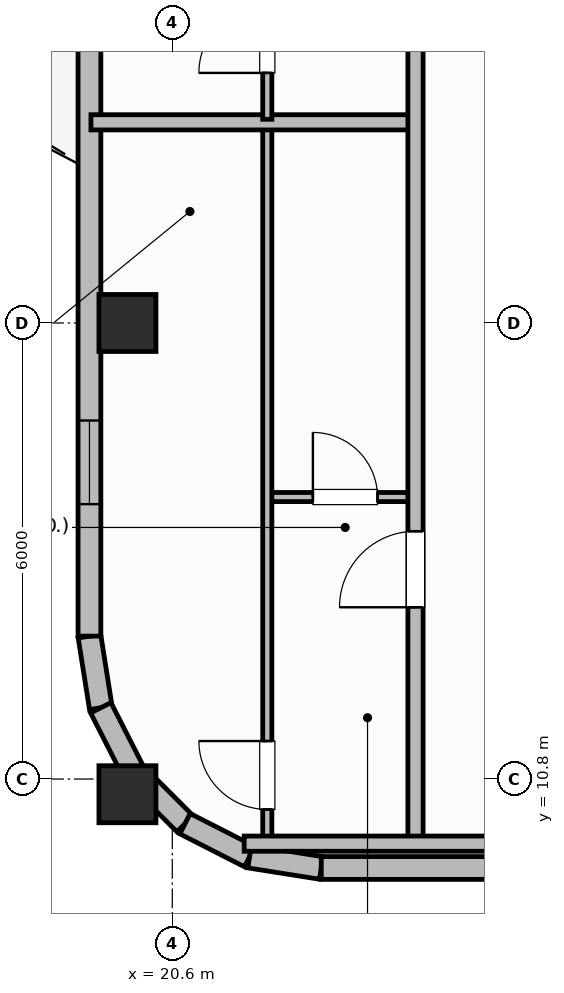
"""IFC4 building model, lengths in metres.
Left out: names, types, materials, properties, quantities, classifications, styles, units other than length and angle.
Written with IfcOpenShell. Run it as: python <this file> out.ifc"""

import sys

from ifc_helpers import new_model, si_unit, direction, frame, frame_2d, origin, origin_2d, place, context, subcontext, project, spatial, rectangle, extrude, element, fill, save


model = new_model("IFC4")
c1 = context("Model", 3, precision=1e-05, world=origin(), true_north=direction((0.0, 1.0)))
c2 = subcontext(c1, "Body", "Model", "MODEL_VIEW")
j1 = project(units=[si_unit("LENGTHUNIT", "METRE"), si_unit("PLANEANGLEUNIT", "RADIAN")], contexts=[c1])
p1 = place(None, origin())
s1 = spatial("IfcSite", under=j1, at=p1, CompositionType="ELEMENT")
p2 = place(p1, origin())
s2 = spatial("IfcBuilding", under=s1, at=p2, CompositionType="ELEMENT")
p3 = place(p2, frame((0.0, 0.0, 271.3)))
s3 = spatial("IfcBuildingStorey", under=s2, at=p3, CompositionType="ELEMENT", Elevation=271.3)
for number, where, z_axis, x_axis in (
    (1, (20.01, 10.6, 0.0), (0.0, 0.0, 1.0), (1.0, 0.0, 0.0)),
    (2, (20.01, 16.8, 0.0), (0.0, 0.0, 1.0), (1.0, 0.0, 0.0)),
):
    element("IfcColumn", number, at=place(p3, frame(where, z_axis=z_axis, x_axis=x_axis)), inside=s3, PredefinedType="COLUMN", context=c2, shape_type="SweptSolid", body=[
        extrude(rectangle(XDim=0.75, YDim=0.75, at=origin_2d()), origin(), (0.0, 0.0, 1.0), 3.7),
    ])
p4 = place(p3, frame((19.51, 12.68, 0.0), z_axis=(0.0, 0.0, 1.0), x_axis=(0.156343617883, -0.987702725088, 0.0)))
e3 = element("IfcWall", 3, at=p4, inside=s3, PredefinedType="SOLIDWALL", context=c2, shape_type="SweptSolid", body=[
    extrude(rectangle(XDim=0.954, YDim=0.3, at=frame_2d((0.477, 0.0))), origin(), (0.0, 0.0, 1.0), 2.73),
])
for number, where, z_axis, x_axis in (
    (4, (19.659, 11.738, 0.0), (0.0, 0.0, 1.0), (0.454, -0.891, 0.0)),
    (5, (20.093, 10.887, 0.0), (0.0, 0.0, 1.0), (0.707, -0.707, 0.0)),
):
    element("IfcWall", number, at=place(p3, frame(where, z_axis=z_axis, x_axis=x_axis)), inside=s3, PredefinedType="SOLIDWALL", context=c2, shape_type="SweptSolid", body=[
        extrude(rectangle(XDim=0.954, YDim=0.3, at=frame_2d((0.477, 0.0))), origin(), (0.0, 0.0, 1.0), 2.73),
    ])
p5 = place(p3, frame((20.767, 10.212, 0.0), z_axis=(0.0, 0.0, 1.0), x_axis=(0.891023873617, -0.45395644796, 0.0)))
e6 = element("IfcWall", 6, at=p5, inside=s3, PredefinedType="SOLIDWALL", context=c2, shape_type="SweptSolid", body=[
    extrude(rectangle(XDim=0.954, YDim=0.3, at=frame_2d((0.477, 0.0))), origin(), (0.0, 0.0, 1.0), 2.73),
])
p6 = place(p3, frame((21.617, 9.779, 0.0), z_axis=(0.0, 0.0, 1.0), x_axis=(0.987669453596, -0.156553666304, 0.0)))
e7 = element("IfcWall", 7, at=p6, inside=s3, PredefinedType="SOLIDWALL", context=c2, shape_type="SweptSolid", body=[
    extrude(rectangle(XDim=0.954, YDim=0.3, at=frame_2d((0.477, 0.0))), origin(), (0.0, 0.0, 1.0), 2.73),
])
p7 = place(p3, frame((22.56, 9.63, 0.0), z_axis=(0.0, 0.0, 1.0), x_axis=(1.0, 0.0, 0.0)))
e8 = element("IfcWall", 8, at=p7, inside=s3, PredefinedType="SOLIDWALL", context=c2, shape_type="SweptSolid", body=[
    extrude(rectangle(XDim=33.28, YDim=0.3, at=frame_2d((16.64, 0.0))), origin(), (0.0, 0.0, 1.0), 2.73),
])
p8 = place(p7, frame((4.448, 0.0, 0.95)))
e9 = element("IfcOpeningElement", 9, at=p8, cuts=e8, PredefinedType="OPENING", context=c2, shape_type="SweptSolid", body=[
    extrude(rectangle(XDim=1.1, YDim=1.65, at=frame_2d((0.55, 0.825))), frame((0.0, 0.16, 0.0), z_axis=(0.0, -1.0, 0.0), x_axis=(1.0, 0.0, 0.0)), (0.0, 0.0, 1.0), 0.32),
])
p9 = place(p7, frame((6.762, 0.0, 0.95)))
e10 = element("IfcOpeningElement", 10, at=p9, cuts=e8, PredefinedType="OPENING", context=c2, shape_type="SweptSolid", body=[
    extrude(rectangle(XDim=1.1, YDim=1.65, at=frame_2d((0.55, 0.825))), frame((0.0, 0.16, 0.0), z_axis=(0.0, -1.0, 0.0), x_axis=(1.0, 0.0, 0.0)), (0.0, 0.0, 1.0), 0.32),
])
p10 = place(p7, frame((9.427, 0.0, 0.95)))
e11 = element("IfcOpeningElement", 11, at=p10, cuts=e8, PredefinedType="OPENING", context=c2, shape_type="SweptSolid", body=[
    extrude(rectangle(XDim=1.1, YDim=1.65, at=frame_2d((0.55, 0.825))), frame((0.0, 0.16, 0.0), z_axis=(0.0, -1.0, 0.0), x_axis=(1.0, 0.0, 0.0)), (0.0, 0.0, 1.0), 0.32),
])
p11 = place(p7, frame((14.758, 0.0, 0.95)))
e12 = element("IfcOpeningElement", 12, at=p11, cuts=e8, PredefinedType="OPENING", context=c2, shape_type="SweptSolid", body=[
    extrude(rectangle(XDim=1.1, YDim=1.65, at=frame_2d((0.55, 0.825))), frame((0.0, 0.16, 0.0), z_axis=(0.0, -1.0, 0.0), x_axis=(1.0, 0.0, 0.0)), (0.0, 0.0, 1.0), 0.32),
])
p12 = place(p7, frame((17.423, 0.0, 0.95)))
e13 = element("IfcOpeningElement", 13, at=p12, cuts=e8, PredefinedType="OPENING", context=c2, shape_type="SweptSolid", body=[
    extrude(rectangle(XDim=1.1, YDim=1.65, at=frame_2d((0.55, 0.825))), frame((0.0, 0.16, 0.0), z_axis=(0.0, -1.0, 0.0), x_axis=(1.0, 0.0, 0.0)), (0.0, 0.0, 1.0), 0.32),
])
p13 = place(p7, frame((22.752, 0.0, 0.95)))
e14 = element("IfcOpeningElement", 14, at=p13, cuts=e8, PredefinedType="OPENING", context=c2, shape_type="SweptSolid", body=[
    extrude(rectangle(XDim=1.1, YDim=1.65, at=frame_2d((0.55, 0.825))), frame((0.0, 0.16, 0.0), z_axis=(0.0, -1.0, 0.0), x_axis=(1.0, 0.0, 0.0)), (0.0, 0.0, 1.0), 0.32),
])
p14 = place(p7, frame((25.417, 0.0, 0.95)))
e15 = element("IfcOpeningElement", 15, at=p14, cuts=e8, PredefinedType="OPENING", context=c2, shape_type="SweptSolid", body=[
    extrude(rectangle(XDim=1.1, YDim=1.65, at=frame_2d((0.55, 0.825))), frame((0.0, 0.16, 0.0), z_axis=(0.0, -1.0, 0.0), x_axis=(1.0, 0.0, 0.0)), (0.0, 0.0, 1.0), 0.32),
])
p15 = place(p7, frame((27.732, 0.0, 0.95)))
e16 = element("IfcOpeningElement", 16, at=p15, cuts=e8, PredefinedType="OPENING", context=c2, shape_type="SweptSolid", body=[
    extrude(rectangle(XDim=1.1, YDim=1.65, at=frame_2d((0.55, 0.825))), frame((0.0, 0.16, 0.0), z_axis=(0.0, -1.0, 0.0), x_axis=(1.0, 0.0, 0.0)), (0.0, 0.0, 1.0), 0.32),
])
p16 = place(p3, frame((19.51, 23.8, 0.0), z_axis=(0.0, 0.0, 1.0), x_axis=(0.0, -1.0, 0.0)))
e17 = element("IfcWall", 17, at=p16, inside=s3, PredefinedType="SOLIDWALL", context=c2, shape_type="SweptSolid", body=[
    extrude(rectangle(XDim=11.12, YDim=0.3, at=frame_2d((5.56, 0.0))), origin(), (0.0, 0.0, 1.0), 2.73),
])
p17 = place(p16, frame((1.7, 0.0, 0.0)))
e18 = element("IfcOpeningElement", 18, at=p17, cuts=e17, PredefinedType="OPENING", context=c2, shape_type="SweptSolid", body=[
    extrude(rectangle(XDim=1.6, YDim=2.1, at=frame_2d((0.8, 1.05))), frame((0.0, 0.16, 0.0), z_axis=(0.0, -1.0, 0.0), x_axis=(1.0, 0.0, 0.0)), (0.0, 0.0, 1.0), 0.32),
])
p18 = place(p16, frame((8.283, 0.0, 0.95)))
e19 = element("IfcOpeningElement", 19, at=p18, cuts=e17, PredefinedType="OPENING", context=c2, shape_type="SweptSolid", body=[
    extrude(rectangle(XDim=1.1, YDim=1.65, at=frame_2d((0.55, 0.825))), frame((0.0, 0.16, 0.0), z_axis=(0.0, -1.0, 0.0), x_axis=(1.0, 0.0, 0.0)), (0.0, 0.0, 1.0), 0.32),
])
p19 = place(p3, frame((21.85, 14.51, 0.0), z_axis=(0.0, 0.0, 1.0), x_axis=(1.0, 0.0, 0.0)))
e20 = element("IfcWall", 20, at=p19, inside=s3, PredefinedType="PARTITIONING", context=c2, shape_type="SweptSolid", body=[
    extrude(rectangle(XDim=1.95, YDim=0.12, at=frame_2d((0.975, 0.0))), origin(), (0.0, 0.0, 1.0), 2.56),
])
p20 = place(p19, frame((0.6, 0.0, 0.0)))
e21 = element("IfcOpeningElement", 21, at=p20, cuts=e20, PredefinedType="OPENING", context=c2, shape_type="SweptSolid", body=[
    extrude(rectangle(XDim=0.85, YDim=2.1, at=frame_2d((0.425, 1.05))), frame((0.0, 0.07, 0.0), z_axis=(0.0, -1.0, 0.0), x_axis=(1.0, 0.0, 0.0)), (0.0, 0.0, 1.0), 0.14),
])
p21 = place(p3, frame((21.85, 9.99, 0.0), z_axis=(0.0, 0.0, 1.0), x_axis=(0.0, 1.0, 0.0)))
e22 = element("IfcWall", 22, at=p21, inside=s3, PredefinedType="PARTITIONING", context=c2, shape_type="SweptSolid", body=[
    extrude(rectangle(XDim=9.41, YDim=0.12, at=frame_2d((4.705, 0.0))), origin(), (0.0, 0.0, 1.0), 2.56),
])
p22 = place(p21, frame((0.41, 0.0, 0.0)))
e23 = element("IfcOpeningElement", 23, at=p22, cuts=e22, PredefinedType="OPENING", context=c2, shape_type="SweptSolid", body=[
    extrude(rectangle(XDim=0.9, YDim=2.1, at=frame_2d((0.45, 1.05))), frame((0.0, 0.07, 0.0), z_axis=(0.0, -1.0, 0.0), x_axis=(1.0, 0.0, 0.0)), (0.0, 0.0, 1.0), 0.14),
])
p23 = place(p3, frame((19.53, 19.44, 0.0), z_axis=(0.0, 0.0, 1.0), x_axis=(1.0, 0.0, 0.0)))
e24 = element("IfcWall", 24, at=p23, inside=s3, PredefinedType="PARTITIONING", context=c2, shape_type="SweptSolid", body=[
    extrude(rectangle(XDim=4.27, YDim=0.2, at=frame_2d((2.135, 0.0))), origin(), (0.0, 0.0, 1.0), 2.56),
])
p24 = place(p3, frame((21.85, 19.48, 0.0), z_axis=(0.0, 0.0, 1.0), x_axis=(0.0, 1.0, 0.0)))
e25 = element("IfcWall", 25, at=p24, inside=s3, PredefinedType="PARTITIONING", context=c2, shape_type="SweptSolid", body=[
    extrude(rectangle(XDim=13.23, YDim=0.12, at=frame_2d((6.615, 0.0))), origin(), (0.0, 0.0, 1.0), 2.56),
])
p25 = place(p24, frame((0.61, 0.0, 0.0)))
e26 = element("IfcOpeningElement", 26, at=p25, cuts=e25, PredefinedType="OPENING", context=c2, shape_type="SweptSolid", body=[
    extrude(rectangle(XDim=0.9, YDim=2.1, at=frame_2d((0.45, 1.05))), frame((0.0, 0.07, 0.0), z_axis=(0.0, -1.0, 0.0), x_axis=(1.0, 0.0, 0.0)), (0.0, 0.0, 1.0), 0.14),
])
p26 = place(p24, frame((10.79, 0.0, 0.0)))
e27 = element("IfcOpeningElement", 27, at=p26, cuts=e25, PredefinedType="OPENING", context=c2, shape_type="SweptSolid", body=[
    extrude(rectangle(XDim=0.82, YDim=2.08, at=frame_2d((0.41, 1.04))), frame((0.0, 0.07, 0.0), z_axis=(0.0, -1.0, 0.0), x_axis=(1.0, 0.0, 0.0)), (0.0, 0.0, 1.0), 0.14),
])
p27 = place(p3, frame((23.8, 9.95, 0.0), z_axis=(0.0, 0.0, 1.0), x_axis=(0.0, 1.0, 0.0)))
e28 = element("IfcWall", 28, at=p27, inside=s3, PredefinedType="PARTITIONING", context=c2, shape_type="SweptSolid", body=[
    extrude(rectangle(XDim=36.5, YDim=0.2, at=frame_2d((18.25, 0.0))), origin(), (0.0, 0.0, 1.0), 2.56),
])
p28 = place(p27, frame((3.11, 0.0, 0.0)))
e29 = element("IfcOpeningElement", 29, at=p28, cuts=e28, PredefinedType="OPENING", context=c2, shape_type="SweptSolid", body=[
    extrude(rectangle(XDim=1.0, YDim=2.15, at=frame_2d((0.5, 1.075))), frame((0.0, 0.11, 0.0), z_axis=(0.0, -1.0, 0.0), x_axis=(1.0, 0.0, 0.0)), (0.0, 0.0, 1.0), 0.22),
])
p29 = place(p27, frame((11.99, 0.0, 0.0)))
e30 = element("IfcOpeningElement", 30, at=p29, cuts=e28, PredefinedType="OPENING", context=c2, shape_type="SweptSolid", body=[
    extrude(rectangle(XDim=1.0, YDim=2.15, at=frame_2d((0.5, 1.075))), frame((0.0, 0.11, 0.0), z_axis=(0.0, -1.0, 0.0), x_axis=(1.0, 0.0, 0.0)), (0.0, 0.0, 1.0), 0.22),
])
p30 = place(p27, frame((23.5, 0.0, 0.0)))
e31 = element("IfcOpeningElement", 31, at=p30, cuts=e28, PredefinedType="OPENING", context=c2, shape_type="SweptSolid", body=[
    extrude(rectangle(XDim=1.0, YDim=2.15, at=frame_2d((0.5, 1.075))), frame((0.0, 0.11, 0.0), z_axis=(0.0, -1.0, 0.0), x_axis=(1.0, 0.0, 0.0)), (0.0, 0.0, 1.0), 0.22),
])
p31 = place(p27, frame((31.2, 0.0, 0.0)))
e32 = element("IfcOpeningElement", 32, at=p31, cuts=e28, PredefinedType="OPENING", context=c2, shape_type="SweptSolid", body=[
    extrude(rectangle(XDim=1.0, YDim=2.15, at=frame_2d((0.5, 1.075))), frame((0.0, 0.11, 0.0), z_axis=(0.0, -1.0, 0.0), x_axis=(1.0, 0.0, 0.0)), (0.0, 0.0, 1.0), 0.22),
])
p32 = place(p3, frame((21.546, 9.95, 0.0), z_axis=(0.0, 0.0, 1.0), x_axis=(1.0, 0.0, 0.0)))
e33 = element("IfcWall", 33, at=p32, inside=s3, PredefinedType="PARTITIONING", context=c2, shape_type="SweptSolid", body=[
    extrude(rectangle(XDim=3.754, YDim=0.2, at=frame_2d((1.877, 0.0))), origin(), (0.0, 0.0, 1.0), 2.56),
])
p33 = place(p18, origin())
e34 = element("IfcWindow", 34, at=p33, inside=s3, PartitioningType="SINGLE_PANEL", PredefinedType="WINDOW", context=c2, shape_type="SweptSolid", body=[
    extrude(rectangle(XDim=1.1, YDim=1.65, at=frame_2d((0.55, 0.825))), frame((0.0, 0.03, 0.0), z_axis=(0.0, -1.0, 0.0), x_axis=(1.0, 0.0, 0.0)), (0.0, 0.0, 1.0), 0.06),
])
fill(e19, e34)
p34 = place(p20, origin())
e35 = element("IfcDoor", 35, at=p34, inside=s3, OperationType="SINGLE_SWING_LEFT", PredefinedType="DOOR", context=c2, shape_type="SweptSolid", body=[
    extrude(rectangle(XDim=0.85, YDim=2.1, at=frame_2d((0.425, 1.05))), frame((0.0, 0.025, 0.0), z_axis=(0.0, -1.0, 0.0), x_axis=(1.0, 0.0, 0.0)), (0.0, 0.0, 1.0), 0.05),
])
fill(e21, e35)
p35 = place(p22, origin())
e36 = element("IfcDoor", 36, at=p35, inside=s3, OperationType="SINGLE_SWING_RIGHT", PredefinedType="DOOR", context=c2, shape_type="SweptSolid", body=[
    extrude(rectangle(XDim=0.9, YDim=2.1, at=frame_2d((0.45, 1.05))), frame((0.0, 0.025, 0.0), z_axis=(0.0, -1.0, 0.0), x_axis=(1.0, 0.0, 0.0)), (0.0, 0.0, 1.0), 0.05),
])
fill(e23, e36)
p36 = place(p25, origin())
e37 = element("IfcDoor", 37, at=p36, inside=s3, OperationType="SINGLE_SWING_LEFT", PredefinedType="DOOR", context=c2, shape_type="SweptSolid", body=[
    extrude(rectangle(XDim=0.9, YDim=2.1, at=frame_2d((0.45, 1.05))), frame((0.0, 0.025, 0.0), z_axis=(0.0, -1.0, 0.0), x_axis=(1.0, 0.0, 0.0)), (0.0, 0.0, 1.0), 0.05),
])
fill(e26, e37)
p37 = place(p28, origin())
e38 = element("IfcDoor", 38, at=p37, inside=s3, OperationType="SINGLE_SWING_LEFT", PredefinedType="DOOR", context=c2, shape_type="SweptSolid", body=[
    extrude(rectangle(XDim=1.0, YDim=2.15, at=frame_2d((0.5, 1.075))), frame((0.0, 0.025, 0.0), z_axis=(0.0, -1.0, 0.0), x_axis=(1.0, 0.0, 0.0)), (0.0, 0.0, 1.0), 0.05),
])
fill(e29, e38)
save(model, sys.argv[1])
